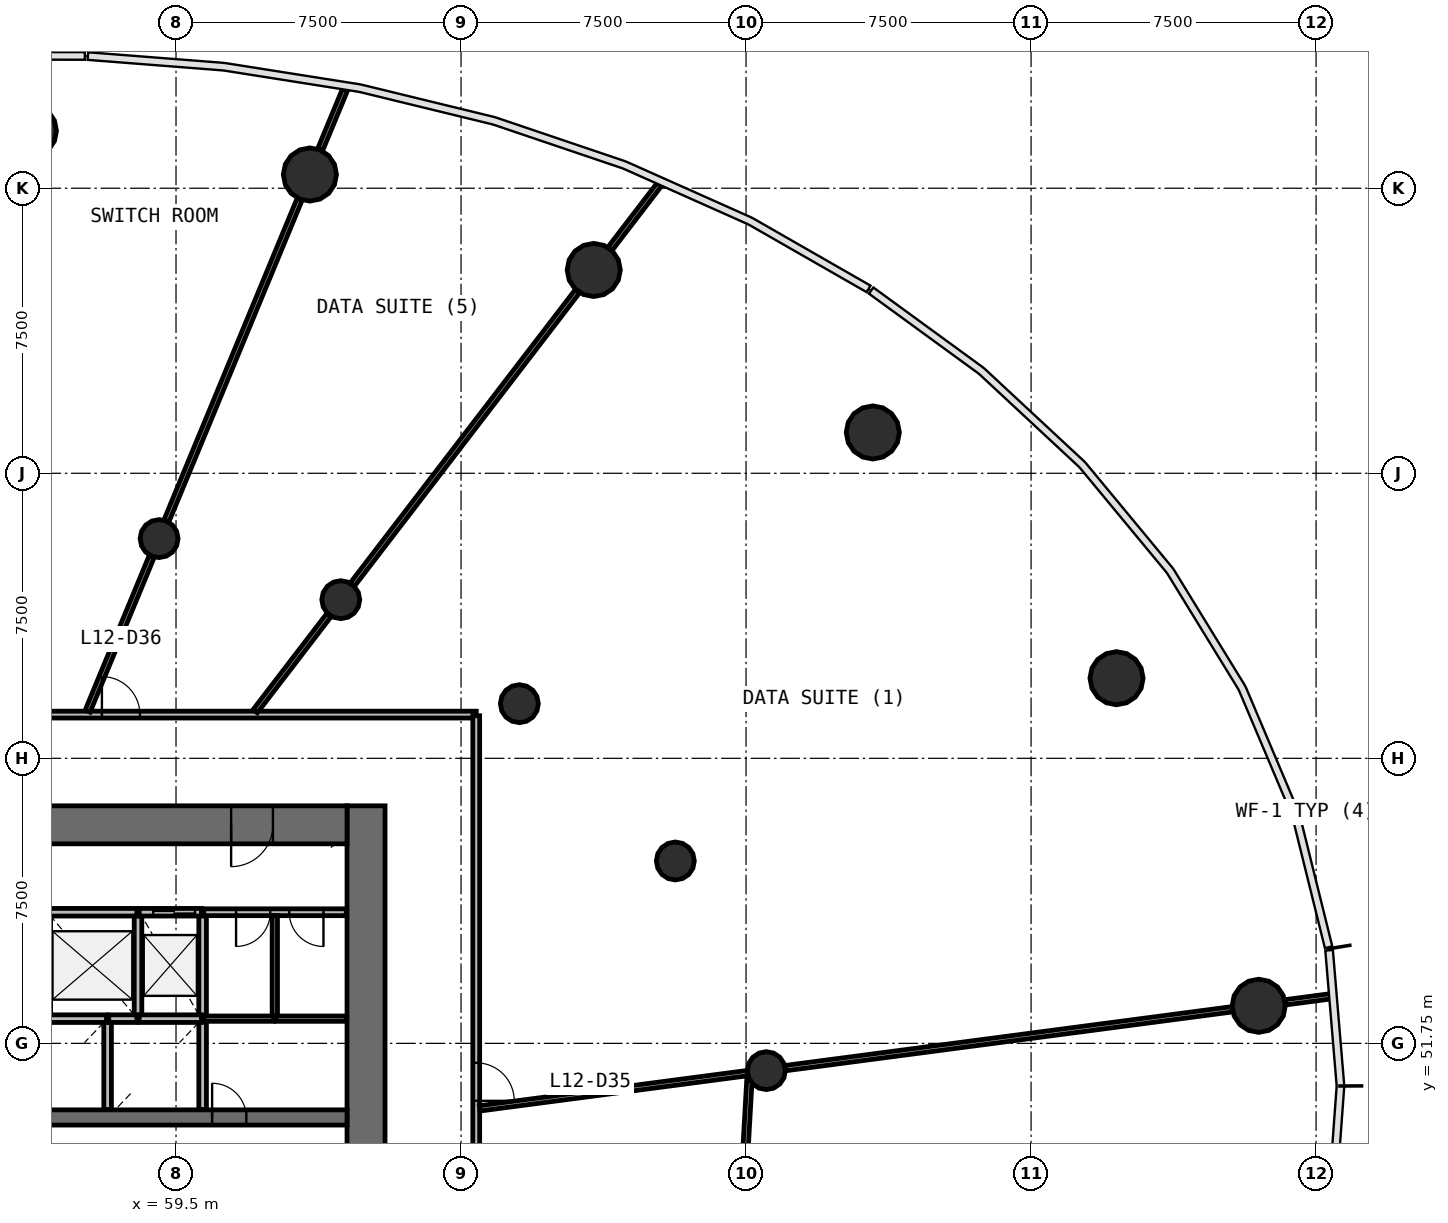
"""IFC4 building model, lengths in metres.
Left out: names, types, materials, properties, quantities, classifications, styles, units other than length and angle.
Written with IfcOpenShell. Run it as: python <this file> out.ifc"""

import sys

from ifc_helpers import new_model, si_unit, direction, frame, frame_2d, origin, origin_2d, place, context, subcontext, project, spatial, rectangle, circle, extrude, source, transform, mapped, element, fill, save


model = new_model("IFC4")
c1 = context("Model", 3, precision=1e-05, world=origin(), true_north=direction((0.0, 1.0)))
c2 = subcontext(c1, "Body", "Model", "MODEL_VIEW")
j1 = project(units=[si_unit("LENGTHUNIT", "METRE"), si_unit("PLANEANGLEUNIT", "RADIAN")], contexts=[c1])
p1 = place(None, origin())
s1 = spatial("IfcSite", under=j1, at=p1, CompositionType="ELEMENT")
p2 = place(p1, origin())
s2 = spatial("IfcBuilding", under=s1, at=p2, CompositionType="ELEMENT")
p3 = place(p2, frame((0.0, 0.0, 53.4)))
s3 = spatial("IfcBuildingStorey", under=s2, at=p3, CompositionType="ELEMENT", Elevation=53.4)
p4 = place(p3, frame((64.5, 38.0, 0.0), z_axis=(0.0, 0.0, 1.0), x_axis=(0.0, 1.0, 0.0)))
e1 = element("IfcWall", 1, at=p4, inside=s3, PredefinedType="SHEAR", context=c2, shape_type="SweptSolid", body=[
    extrude(rectangle(XDim=20.0, YDim=1.0, at=frame_2d((10.0, 0.0))), origin(), (0.0, 0.0, 1.0), 4.4),
])
p5 = place(p4, frame((9.1, 0.0, 0.0)))
e2 = element("IfcOpeningElement", 2, at=p5, cuts=e1, PredefinedType="OPENING", context=c2, shape_type="SweptSolid", body=[
    extrude(rectangle(XDim=1.8, YDim=2.1, at=frame_2d((0.9, 1.05))), frame((0.0, 0.51, 0.0), z_axis=(0.0, -1.0, 0.0), x_axis=(1.0, 0.0, 0.0)), (0.0, 0.0, 1.0), 1.02),
])
p6 = place(p3, frame((64.0, 57.5, 0.0), z_axis=(0.0, 0.0, 1.0), x_axis=(-1.0, 0.0, 0.0)))
e3 = element("IfcWall", 3, at=p6, inside=s3, PredefinedType="SHEAR", context=c2, shape_type="SweptSolid", body=[
    extrude(rectangle(XDim=24.0, YDim=1.0, at=frame_2d((12.0, 0.0))), origin(), (0.0, 0.0, 1.0), 4.4),
])
p7 = place(p6, frame((21.45, 0.0, 0.0)))
e4 = element("IfcOpeningElement", 4, at=p7, cuts=e3, PredefinedType="OPENING", context=c2, shape_type="SweptSolid", body=[
    extrude(rectangle(XDim=1.1, YDim=2.1, at=frame_2d((0.55, 1.05))), frame((0.0, 0.51, 0.0), z_axis=(0.0, -1.0, 0.0), x_axis=(1.0, 0.0, 0.0)), (0.0, 0.0, 1.0), 1.02),
])
p8 = place(p6, frame((1.95, 0.0, 0.0)))
e5 = element("IfcOpeningElement", 5, at=p8, cuts=e3, PredefinedType="OPENING", context=c2, shape_type="SweptSolid", body=[
    extrude(rectangle(XDim=1.1, YDim=2.1, at=frame_2d((0.55, 1.05))), frame((0.0, 0.51, 0.0), z_axis=(0.0, -1.0, 0.0), x_axis=(1.0, 0.0, 0.0)), (0.0, 0.0, 1.0), 1.02),
])
p9 = place(p3, frame((40.0, 49.8, 0.0), z_axis=(0.0, 0.0, 1.0), x_axis=(1.0, 0.0, 0.0)))
e6 = element("IfcWall", 6, at=p9, inside=s3, PredefinedType="SHEAR", context=c2, shape_type="SweptSolid", body=[
    extrude(rectangle(XDim=24.0, YDim=0.4, at=frame_2d((12.0, 0.0))), origin(), (0.0, 0.0, 1.0), 4.4),
])
p10 = place(p9, frame((4.5, 0.0, 0.0)))
e7 = element("IfcOpeningElement", 7, at=p10, cuts=e6, PredefinedType="OPENING", context=c2, shape_type="SweptSolid", body=[
    extrude(rectangle(XDim=1.1, YDim=2.1, at=frame_2d((0.55, 1.05))), frame((0.0, 0.21, 0.0), z_axis=(0.0, -1.0, 0.0), x_axis=(1.0, 0.0, 0.0)), (0.0, 0.0, 1.0), 0.42),
])
p11 = place(p9, frame((7.0, 0.0, 0.0)))
e8 = element("IfcOpeningElement", 8, at=p11, cuts=e6, PredefinedType="OPENING", context=c2, shape_type="SweptSolid", body=[
    extrude(rectangle(XDim=1.1, YDim=2.1, at=frame_2d((0.55, 1.05))), frame((0.0, 0.21, 0.0), z_axis=(0.0, -1.0, 0.0), x_axis=(1.0, 0.0, 0.0)), (0.0, 0.0, 1.0), 0.42),
])
p12 = place(p9, frame((9.5, 0.0, 0.0)))
e9 = element("IfcOpeningElement", 9, at=p12, cuts=e6, PredefinedType="OPENING", context=c2, shape_type="SweptSolid", body=[
    extrude(rectangle(XDim=1.1, YDim=2.1, at=frame_2d((0.55, 1.05))), frame((0.0, 0.21, 0.0), z_axis=(0.0, -1.0, 0.0), x_axis=(1.0, 0.0, 0.0)), (0.0, 0.0, 1.0), 0.42),
])
p13 = place(p9, frame((0.9, 0.0, 0.0)))
e10 = element("IfcOpeningElement", 10, at=p13, cuts=e6, PredefinedType="OPENING", context=c2, shape_type="SweptSolid", body=[
    extrude(rectangle(XDim=1.8, YDim=2.4, at=frame_2d((0.9, 1.2))), frame((0.0, 0.21, 0.0), z_axis=(0.0, -1.0, 0.0), x_axis=(1.0, 0.0, 0.0)), (0.0, 0.0, 1.0), 0.42),
])
p14 = place(p9, frame((20.45, 0.0, 0.0)))
e11 = element("IfcOpeningElement", 11, at=p14, cuts=e6, PredefinedType="OPENING", context=c2, shape_type="SweptSolid", body=[
    extrude(rectangle(XDim=0.9, YDim=2.1, at=frame_2d((0.45, 1.05))), frame((0.0, 0.21, 0.0), z_axis=(0.0, -1.0, 0.0), x_axis=(1.0, 0.0, 0.0)), (0.0, 0.0, 1.0), 0.42),
])
p15 = place(p9, frame((11.65, 0.0, 0.0)))
e12 = element("IfcOpeningElement", 12, at=p15, cuts=e6, PredefinedType="OPENING", context=c2, shape_type="SweptSolid", body=[
    extrude(rectangle(XDim=0.9, YDim=2.1, at=frame_2d((0.45, 1.05))), frame((0.0, 0.21, 0.0), z_axis=(0.0, -1.0, 0.0), x_axis=(1.0, 0.0, 0.0)), (0.0, 0.0, 1.0), 0.42),
])
m1 = source(origin(), c2, "Body", "SweptSolid", [
    extrude(circle(Radius=0.7, at=origin_2d()), origin(), (0.0, 0.0, 1.0), 4.4),
])
for number, where, z_axis, x_axis in (
    (13, (87.99, 52.738, 0.0), (0.0, 0.0, 1.0), (1.0, 0.0, 0.0)),
    (14, (84.249, 61.358, 0.0), (0.0, 0.0, 1.0), (1.0, 0.0, 0.0)),
    (15, (77.836, 67.824, 0.0), (0.0, 0.0, 1.0), (1.0, 0.0, 0.0)),
    (16, (70.492, 72.1, 0.0), (0.0, 0.0, 1.0), (1.0, 0.0, 0.0)),
    (17, (63.023, 74.611, 0.0), (0.0, 0.0, 1.0), (1.0, 0.0, 0.0)),
    (18, (55.655, 75.761, 0.0), (0.0, 0.0, 1.0), (1.0, 0.0, 0.0)),
):
    element("IfcColumn", number, at=place(p3, frame(where, z_axis=z_axis, x_axis=x_axis)), inside=s3, PredefinedType="COLUMN", context=c2, shape_type="MappedRepresentation", body=[
        mapped(m1, transform((0.0, 0.0, 0.0), scale=1.0)),
    ])
m2 = source(origin(), c2, "Body", "SweptSolid", [
    extrude(circle(Radius=0.5, at=origin_2d()), origin(), (0.0, 0.0, 1.0), 4.4),
])
for number, where, z_axis, x_axis in (
    (19, (75.034, 51.032, 0.0), (0.0, 0.0, 1.0), (1.0, 0.0, 0.0)),
    (20, (72.639, 56.549, 0.0), (0.0, 0.0, 1.0), (1.0, 0.0, 0.0)),
    (21, (68.535, 60.688, 0.0), (0.0, 0.0, 1.0), (1.0, 0.0, 0.0)),
    (22, (63.835, 63.424, 0.0), (0.0, 0.0, 1.0), (1.0, 0.0, 0.0)),
    (23, (59.055, 65.031, 0.0), (0.0, 0.0, 1.0), (1.0, 0.0, 0.0)),
):
    element("IfcColumn", number, at=place(p3, frame(where, z_axis=z_axis, x_axis=x_axis)), inside=s3, PredefinedType="COLUMN", context=c2, shape_type="MappedRepresentation", body=[
        mapped(m2, transform((0.0, 0.0, 0.0), scale=1.0)),
    ])
for number, where, z_axis, x_axis in (
    (24, (58.5, 52.4, 0.0), (0.0, 0.0, 1.0), (0.0, 1.0, 0.0)),
    (25, (60.2, 52.4, 0.0), (0.0, 0.0, 1.0), (0.0, 1.0, 0.0)),
):
    element("IfcWall", number, at=place(p3, frame(where, z_axis=z_axis, x_axis=x_axis)), inside=s3, PredefinedType="SOLIDWALL", context=c2, shape_type="SweptSolid", body=[
        extrude(rectangle(XDim=2.8, YDim=0.2, at=frame_2d((1.4, 0.0))), origin(), (0.0, 0.0, 1.0), 3.95),
    ])
p16 = place(p3, frame((58.47, 55.2, 0.0), z_axis=(0.0, 0.0, 1.0), x_axis=(-1.0, 0.0, 0.0)))
e26 = element("IfcWall", 26, at=p16, inside=s3, PredefinedType="SOLIDWALL", context=c2, shape_type="SweptSolid", body=[
    extrude(rectangle(XDim=2.34, YDim=0.2, at=frame_2d((1.17, 0.0))), origin(), (0.0, 0.0, 1.0), 3.95),
])
p17 = place(p3, frame((57.7, 50.01, 0.0), z_axis=(0.0, 0.0, 1.0), x_axis=(0.0, 1.0, 0.0)))
e27 = element("IfcWall", 27, at=p17, inside=s3, PredefinedType="SOLIDWALL", context=c2, shape_type="SweptSolid", body=[
    extrude(rectangle(XDim=2.39, YDim=0.2, at=frame_2d((1.195, 0.0))), origin(), (0.0, 0.0, 1.0), 3.95),
])
p18 = place(p3, frame((60.2, 50.01, 0.0), z_axis=(0.0, 0.0, 1.0), x_axis=(0.0, 1.0, 0.0)))
e28 = element("IfcWall", 28, at=p18, inside=s3, PredefinedType="SOLIDWALL", context=c2, shape_type="SweptSolid", body=[
    extrude(rectangle(XDim=2.36, YDim=0.2, at=frame_2d((1.18, 0.0))), origin(), (0.0, 0.0, 1.0), 3.95),
])
p19 = place(p3, frame((60.17, 52.4, 0.0), z_axis=(0.0, 0.0, 1.0), x_axis=(-1.0, 0.0, 0.0)))
e29 = element("IfcWall", 29, at=p19, inside=s3, PredefinedType="SOLIDWALL", context=c2, shape_type="SweptSolid", body=[
    extrude(rectangle(XDim=1.64, YDim=0.2, at=frame_2d((0.82, 0.0))), origin(), (0.0, 0.0, 1.0), 3.95),
])
p20 = place(p3, frame((60.17, 55.2, 0.0), z_axis=(0.0, 0.0, 1.0), x_axis=(-1.0, 0.0, 0.0)))
e30 = element("IfcWall", 30, at=p20, inside=s3, PredefinedType="SOLIDWALL", context=c2, shape_type="SweptSolid", body=[
    extrude(rectangle(XDim=1.64, YDim=0.2, at=frame_2d((0.82, 0.0))), origin(), (0.0, 0.0, 1.0), 3.95),
])
p21 = place(p20, frame((0.17, 0.0, 0.0)))
e31 = element("IfcOpeningElement", 31, at=p21, cuts=e30, PredefinedType="OPENING", context=c2, shape_type="SweptSolid", body=[
    extrude(rectangle(XDim=1.1, YDim=2.1, at=frame_2d((0.55, 1.05))), frame((0.0, 0.11, 0.0), z_axis=(0.0, -1.0, 0.0), x_axis=(1.0, 0.0, 0.0)), (0.0, 0.0, 1.0), 0.22),
])
p22 = place(p3, frame((57.67, 52.4, 0.0), z_axis=(0.0, 0.0, 1.0), x_axis=(-1.0, 0.0, 0.0)))
e32 = element("IfcWall", 32, at=p22, inside=s3, PredefinedType="SOLIDWALL", context=c2, shape_type="SweptSolid", body=[
    extrude(rectangle(XDim=1.54, YDim=0.2, at=frame_2d((0.77, 0.0))), origin(), (0.0, 0.0, 1.0), 3.95),
])
p23 = place(p3, frame((58.47, 52.4, 0.0), z_axis=(0.0, 0.0, 1.0), x_axis=(-1.0, 0.0, 0.0)))
e33 = element("IfcWall", 33, at=p23, inside=s3, PredefinedType="SOLIDWALL", context=c2, shape_type="SweptSolid", body=[
    extrude(rectangle(XDim=0.74, YDim=0.2, at=frame_2d((0.37, 0.0))), origin(), (0.0, 0.0, 1.0), 3.95),
])
p24 = place(p3, frame((36.6, 60.4, 0.0), z_axis=(0.0, 0.0, 1.0), x_axis=(1.0, 0.0, 0.0)))
e34 = element("IfcWall", 34, at=p24, inside=s3, PredefinedType="PARTITIONING", context=c2, shape_type="SweptSolid", body=[
    extrude(rectangle(XDim=30.8, YDim=0.18, at=frame_2d((15.4, 0.0))), origin(), (0.0, 0.0, 1.0), 3.05),
])
p25 = place(p24, frame((20.95, 0.0, 0.0)))
e35 = element("IfcOpeningElement", 35, at=p25, cuts=e34, PredefinedType="OPENING", context=c2, shape_type="SweptSolid", body=[
    extrude(rectangle(XDim=1.0, YDim=2.1, at=frame_2d((0.5, 1.05))), frame((0.0, 0.1, 0.0), z_axis=(0.0, -1.0, 0.0), x_axis=(1.0, 0.0, 0.0)), (0.0, 0.0, 1.0), 0.2),
])
p26 = place(p24, frame((17.35, 0.0, 0.0)))
e36 = element("IfcOpeningElement", 36, at=p26, cuts=e34, PredefinedType="OPENING", context=c2, shape_type="SweptSolid", body=[
    extrude(rectangle(XDim=1.0, YDim=2.1, at=frame_2d((0.5, 1.05))), frame((0.0, 0.1, 0.0), z_axis=(0.0, -1.0, 0.0), x_axis=(1.0, 0.0, 0.0)), (0.0, 0.0, 1.0), 0.2),
])
p27 = place(p24, frame((14.95, 0.0, 0.0)))
e37 = element("IfcOpeningElement", 37, at=p27, cuts=e34, PredefinedType="OPENING", context=c2, shape_type="SweptSolid", body=[
    extrude(rectangle(XDim=1.0, YDim=2.1, at=frame_2d((0.5, 1.05))), frame((0.0, 0.1, 0.0), z_axis=(0.0, -1.0, 0.0), x_axis=(1.0, 0.0, 0.0)), (0.0, 0.0, 1.0), 0.2),
])
p28 = place(p3, frame((67.4, 60.37, 0.0), z_axis=(0.0, 0.0, 1.0), x_axis=(0.0, -1.0, 0.0)))
e38 = element("IfcWall", 38, at=p28, inside=s3, PredefinedType="PARTITIONING", context=c2, shape_type="SweptSolid", body=[
    extrude(rectangle(XDim=23.583, YDim=0.18, at=frame_2d((11.791, 0.0))), origin(), (0.0, 0.0, 1.0), 3.05),
])
p29 = place(p28, frame((11.333, 0.0, 0.0)))
e39 = element("IfcOpeningElement", 39, at=p29, cuts=e38, PredefinedType="OPENING", context=c2, shape_type="SweptSolid", body=[
    extrude(rectangle(XDim=1.0, YDim=2.1, at=frame_2d((0.5, 1.05))), frame((0.0, 0.1, 0.0), z_axis=(0.0, -1.0, 0.0), x_axis=(1.0, 0.0, 0.0)), (0.0, 0.0, 1.0), 0.2),
])
p30 = place(p28, frame((9.133, 0.0, 0.0)))
e40 = element("IfcOpeningElement", 40, at=p30, cuts=e38, PredefinedType="OPENING", context=c2, shape_type="SweptSolid", body=[
    extrude(rectangle(XDim=1.0, YDim=2.1, at=frame_2d((0.5, 1.05))), frame((0.0, 0.1, 0.0), z_axis=(0.0, -1.0, 0.0), x_axis=(1.0, 0.0, 0.0)), (0.0, 0.0, 1.0), 0.2),
])
p31 = place(p3, frame((63.98, 55.2, 0.0), z_axis=(0.0, 0.0, 1.0), x_axis=(-1.0, 0.0, 0.0)))
e41 = element("IfcWall", 41, at=p31, inside=s3, PredefinedType="PARTITIONING", context=c2, shape_type="SweptSolid", body=[
    extrude(rectangle(XDim=3.75, YDim=0.18, at=frame_2d((1.875, 0.0))), origin(), (0.0, 0.0, 1.0), 3.95),
])
p32 = place(p31, frame((2.0, 0.0, 0.0)))
e42 = element("IfcOpeningElement", 42, at=p32, cuts=e41, PredefinedType="OPENING", context=c2, shape_type="SweptSolid", body=[
    extrude(rectangle(XDim=0.9, YDim=2.1, at=frame_2d((0.45, 1.05))), frame((0.0, 0.1, 0.0), z_axis=(0.0, -1.0, 0.0), x_axis=(1.0, 0.0, 0.0)), (0.0, 0.0, 1.0), 0.2),
])
p33 = place(p31, frame((0.6, 0.0, 0.0)))
e43 = element("IfcOpeningElement", 43, at=p33, cuts=e41, PredefinedType="OPENING", context=c2, shape_type="SweptSolid", body=[
    extrude(rectangle(XDim=0.9, YDim=2.1, at=frame_2d((0.45, 1.05))), frame((0.0, 0.1, 0.0), z_axis=(0.0, -1.0, 0.0), x_axis=(1.0, 0.0, 0.0)), (0.0, 0.0, 1.0), 0.2),
])
p34 = place(p3, frame((75.534, 51.098, 0.0), z_axis=(0.0, 0.0, 1.0), x_axis=(0.991446586451, 0.130513088287, 0.0)))
e44 = element("IfcWall", 44, at=p34, inside=s3, PredefinedType="PARTITIONING", context=c2, shape_type="SweptSolid", body=[
    extrude(rectangle(XDim=11.86, YDim=0.14, at=frame_2d((5.93, 0.0))), origin(), (0.0, 0.0, 1.0), 3.05),
])
p35 = place(p3, frame((64.142, 63.824, 0.0), z_axis=(0.0, 0.0, 1.0), x_axis=(0.608770295053, 0.793346537057, 0.0)))
e45 = element("IfcWall", 45, at=p35, inside=s3, PredefinedType="PARTITIONING", context=c2, shape_type="SweptSolid", body=[
    extrude(rectangle(XDim=9.727, YDim=0.14, at=frame_2d((4.864, 0.0))), origin(), (0.0, 0.0, 1.0), 3.05),
])
p36 = place(p3, frame((59.248, 65.498, 0.0), z_axis=(0.0, 0.0, 1.0), x_axis=(0.382672728165, 0.923883966264, 0.0)))
e46 = element("IfcWall", 46, at=p36, inside=s3, PredefinedType="PARTITIONING", context=c2, shape_type="SweptSolid", body=[
    extrude(rectangle(XDim=9.16, YDim=0.14, at=frame_2d((4.58, 0.0))), origin(), (0.0, 0.0, 1.0), 3.05),
])
p37 = place(p3, frame((67.49, 50.039, 0.0), z_axis=(0.0, 0.0, 1.0), x_axis=(0.99144622305, 0.130515848849, 0.0)))
e47 = element("IfcWall", 47, at=p37, inside=s3, PredefinedType="PARTITIONING", context=c2, shape_type="SweptSolid", body=[
    extrude(rectangle(XDim=7.104, YDim=0.14, at=frame_2d((3.552, 0.0))), origin(), (0.0, 0.0, 1.0), 3.05),
])
p38 = place(p3, frame((74.589, 50.793, 0.0), z_axis=(0.0, 0.0, 1.0), x_axis=(-0.056551571082, -0.998399679391, 0.0)))
e48 = element("IfcWall", 48, at=p38, inside=s3, PredefinedType="PARTITIONING", context=c2, shape_type="SweptSolid", body=[
    extrude(rectangle(XDim=5.401, YDim=0.14, at=frame_2d((2.7, 0.0))), origin(), (0.0, 0.0, 1.0), 3.05),
])
p39 = place(p38, frame((2.151, 0.0, 0.0)))
e49 = element("IfcOpeningElement", 49, at=p39, cuts=e48, PredefinedType="OPENING", context=c2, shape_type="SweptSolid", body=[
    extrude(rectangle(XDim=1.0, YDim=2.1, at=frame_2d((0.5, 1.05))), frame((0.0, 0.08, 0.0), z_axis=(0.0, -1.0, 0.0), x_axis=(1.0, 0.0, 0.0)), (0.0, 0.0, 1.0), 0.16),
])
p40 = place(p3, frame((57.174, 60.49, 0.0), z_axis=(0.0, 0.0, 1.0), x_axis=(0.382672831764, 0.923883923353, 0.0)))
e50 = element("IfcWall", 50, at=p40, inside=s3, PredefinedType="PARTITIONING", context=c2, shape_type="SweptSolid", body=[
    extrude(rectangle(XDim=4.41, YDim=0.14, at=frame_2d((2.205, 0.0))), origin(), (0.0, 0.0, 1.0), 3.05),
])
p41 = place(p3, frame((61.584, 60.49, 0.0), z_axis=(0.0, 0.0, 1.0), x_axis=(0.60874605662, 0.793365135703, 0.0)))
e51 = element("IfcWall", 51, at=p41, inside=s3, PredefinedType="PARTITIONING", context=c2, shape_type="SweptSolid", body=[
    extrude(rectangle(XDim=3.194, YDim=0.14, at=frame_2d((1.597, 0.0))), origin(), (0.0, 0.0, 1.0), 3.05),
])
p42 = place(p3, frame((62.1, 52.4, 0.0), z_axis=(0.0, 0.0, 1.0), x_axis=(0.0, 1.0, 0.0)))
e52 = element("IfcWall", 52, at=p42, inside=s3, PredefinedType="PARTITIONING", context=c2, shape_type="SweptSolid", body=[
    extrude(rectangle(XDim=2.71, YDim=0.14, at=frame_2d((1.355, 0.0))), origin(), (0.0, 0.0, 1.0), 3.05),
])
p43 = place(p3, frame((70.921, 72.658, 0.0), z_axis=(0.0, 0.0, 1.0), x_axis=(0.608822106268, 0.793306777306, 0.0)))
e53 = element("IfcWall", 53, at=p43, inside=s3, PredefinedType="PARTITIONING", context=c2, shape_type="SweptSolid", body=[
    extrude(rectangle(XDim=2.152, YDim=0.14, at=frame_2d((1.076, 0.0))), origin(), (0.0, 0.0, 1.0), 3.05),
])
p44 = place(p3, frame((62.07, 52.4, 0.0), z_axis=(0.0, 0.0, 1.0), x_axis=(-1.0, 0.0, 0.0)))
e54 = element("IfcWall", 54, at=p44, inside=s3, PredefinedType="PARTITIONING", context=c2, shape_type="SweptSolid", body=[
    extrude(rectangle(XDim=1.84, YDim=0.14, at=frame_2d((0.92, 0.0))), origin(), (0.0, 0.0, 1.0), 3.05),
])
p45 = place(p3, frame((63.98, 52.4, 0.0), z_axis=(0.0, 0.0, 1.0), x_axis=(-1.0, 0.0, 0.0)))
e55 = element("IfcWall", 55, at=p45, inside=s3, PredefinedType="PARTITIONING", context=c2, shape_type="SweptSolid", body=[
    extrude(rectangle(XDim=1.85, YDim=0.14, at=frame_2d((0.925, 0.0))), origin(), (0.0, 0.0, 1.0), 3.05),
])
p46 = place(p3, frame((63.292, 75.263, 0.0), z_axis=(0.0, 0.0, 1.0), x_axis=(0.382632674553, 0.923900555452, 0.0)))
e56 = element("IfcWall", 56, at=p46, inside=s3, PredefinedType="PARTITIONING", context=c2, shape_type="SweptSolid", body=[
    extrude(rectangle(XDim=1.714, YDim=0.14, at=frame_2d((0.857, 0.0))), origin(), (0.0, 0.0, 1.0), 3.05),
])
p47 = place(p3, frame((88.689, 52.83, 0.0), z_axis=(0.0, 0.0, 1.0), x_axis=(0.991424298155, 0.130682290411, 0.0)))
e57 = element("IfcWall", 57, at=p47, inside=s3, PredefinedType="PARTITIONING", context=c2, shape_type="SweptSolid", body=[
    extrude(rectangle(XDim=1.22, YDim=0.14, at=frame_2d((0.61, 0.0))), origin(), (0.0, 0.0, 1.0), 3.05),
])
m3 = source(origin(), c2, "Body", "SweptSolid", [
    extrude(rectangle(XDim=1.1, YDim=2.1, at=frame_2d((0.55, 1.05))), frame((0.0, 0.025, 0.0), z_axis=(0.0, -1.0, 0.0), x_axis=(1.0, 0.0, 0.0)), (0.0, 0.0, 1.0), 0.05),
])
p48 = place(p21, origin())
e58 = element("IfcDoor", 58, at=p48, inside=s3, OperationType="DOUBLE_DOOR_SLIDING", PredefinedType="USERDEFINED", context=c2, shape_type="MappedRepresentation", body=[
    mapped(m3, transform((0.0, 0.0, 0.0), scale=1.0)),
])
fill(e31, e58)
m4 = source(origin(), c2, "Body", "SweptSolid", [
    extrude(rectangle(XDim=1.1, YDim=2.1, at=frame_2d((0.55, 1.05))), frame((0.0, 0.025, 0.0), z_axis=(0.0, -1.0, 0.0), x_axis=(1.0, 0.0, 0.0)), (0.0, 0.0, 1.0), 0.05),
])
p49 = place(p8, origin())
e59 = element("IfcDoor", 59, at=p49, inside=s3, OperationType="SINGLE_SWING_RIGHT", PredefinedType="DOOR", context=c2, shape_type="MappedRepresentation", body=[
    mapped(m4, transform((0.0, 0.0, 0.0), scale=1.0)),
])
fill(e5, e59)
m5 = source(origin(), c2, "Body", "SweptSolid", [
    extrude(rectangle(XDim=1.0, YDim=2.1, at=frame_2d((0.5, 1.05))), frame((0.0, 0.025, 0.0), z_axis=(0.0, -1.0, 0.0), x_axis=(1.0, 0.0, 0.0)), (0.0, 0.0, 1.0), 0.05),
])
p50 = place(p30, origin())
e60 = element("IfcDoor", 60, at=p50, inside=s3, OperationType="SINGLE_SWING_RIGHT", PredefinedType="DOOR", context=c2, shape_type="MappedRepresentation", body=[
    mapped(m5, transform((0.0, 0.0, 0.0), scale=1.0)),
])
fill(e40, e60)
p51 = place(p25, origin())
e61 = element("IfcDoor", 61, at=p51, inside=s3, OperationType="SINGLE_SWING_LEFT", PredefinedType="DOOR", context=c2, shape_type="MappedRepresentation", body=[
    mapped(m5, transform((0.0, 0.0, 0.0), scale=1.0)),
])
fill(e35, e61)
m6 = source(origin(), c2, "Body", "SweptSolid", [
    extrude(rectangle(XDim=0.9, YDim=2.1, at=frame_2d((0.45, 1.05))), frame((0.0, 0.025, 0.0), z_axis=(0.0, -1.0, 0.0), x_axis=(1.0, 0.0, 0.0)), (0.0, 0.0, 1.0), 0.05),
])
p52 = place(p14, origin())
e62 = element("IfcDoor", 62, at=p52, inside=s3, OperationType="SINGLE_SWING_LEFT", PredefinedType="DOOR", context=c2, shape_type="MappedRepresentation", body=[
    mapped(m6, transform((0.0, 0.0, 0.0), scale=1.0)),
])
fill(e11, e62)
p53 = place(p32, origin())
e63 = element("IfcDoor", 63, at=p53, inside=s3, OperationType="SINGLE_SWING_RIGHT", PredefinedType="DOOR", context=c2, shape_type="MappedRepresentation", body=[
    mapped(m6, transform((0.0, 0.0, 0.0), scale=1.0)),
])
fill(e42, e63)
p54 = place(p33, origin())
e64 = element("IfcDoor", 64, at=p54, inside=s3, OperationType="SINGLE_SWING_LEFT", PredefinedType="DOOR", context=c2, shape_type="MappedRepresentation", body=[
    mapped(m6, transform((0.0, 0.0, 0.0), scale=1.0)),
])
fill(e43, e64)
save(model, sys.argv[1])
